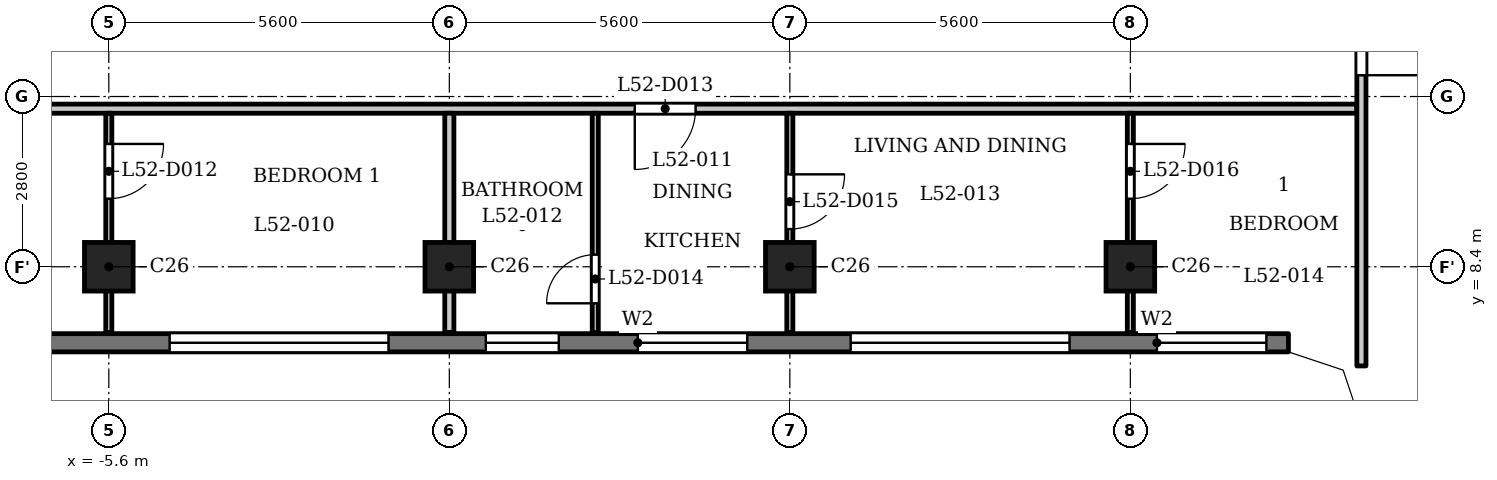
"""IFC4 building model, lengths in metres.
Left out: names, types, materials, properties, quantities, classifications, styles, units other than length and angle.
Written with IfcOpenShell. Run it as: python <this file> out.ifc"""

import sys

from ifc_helpers import new_model, si_unit, direction, frame, frame_2d, origin, origin_2d, place, context, subcontext, project, spatial, polyline, rectangle, outline, extrude, element, fill, save


model = new_model("IFC4")
c1 = context("Model", 3, precision=1e-05, world=origin(), true_north=direction((0.0, 1.0)))
c2 = subcontext(c1, "Body", "Model", "MODEL_VIEW")
j1 = project(units=[si_unit("LENGTHUNIT", "METRE"), si_unit("PLANEANGLEUNIT", "RADIAN")], contexts=[c1])
p1 = place(None, origin())
s1 = spatial("IfcSite", under=j1, at=p1, CompositionType="ELEMENT")
p2 = place(p1, origin())
s2 = spatial("IfcBuilding", under=s1, at=p2, CompositionType="ELEMENT")
p3 = place(p2, frame((0.0, 0.0, 202.9)))
s3 = spatial("IfcBuildingStorey", under=s2, at=p3, CompositionType="ELEMENT", Elevation=202.9)
for number, where, z_axis, x_axis in (
    (1, (-5.6, 8.4, 0.0), (0.0, 0.0, 1.0), (1.0, 0.0, 0.0)),
    (2, (0.0, 8.4, 0.0), (0.0, 0.0, 1.0), (1.0, 0.0, 0.0)),
    (3, (5.6, 8.4, 0.0), (0.0, 0.0, 1.0), (1.0, 0.0, 0.0)),
    (4, (11.2, 8.4, 0.0), (0.0, 0.0, 1.0), (1.0, 0.0, 0.0)),
):
    element("IfcColumn", number, at=place(p3, frame(where, z_axis=z_axis, x_axis=x_axis)), inside=s3, PredefinedType="COLUMN", context=c2, shape_type="SweptSolid", body=[
        extrude(rectangle(XDim=0.8, YDim=0.8, at=origin_2d()), origin(), (0.0, 0.0, 1.0), 3.5),
    ])
p4 = place(p3, frame((-13.8, 7.15, 0.0), z_axis=(0.0, 0.0, 1.0), x_axis=(1.0, 0.0, 0.0)))
e5 = element("IfcWall", 5, at=p4, inside=s3, PredefinedType="SOLIDWALL", context=c2, shape_type="SweptSolid", body=[
    extrude(rectangle(XDim=27.6, YDim=0.3, at=frame_2d((13.8, 0.0))), origin(), (0.0, 0.0, 1.0), 3.2),
])
p5 = place(p4, frame((3.6, 0.0, 1.2)))
e6 = element("IfcOpeningElement", 6, at=p5, cuts=e5, PredefinedType="OPENING", context=c2, shape_type="SweptSolid", body=[
    extrude(rectangle(XDim=3.6, YDim=0.95, at=frame_2d((1.8, 0.475))), frame((0.0, 0.16, 0.0), z_axis=(0.0, -1.0, 0.0), x_axis=(1.0, 0.0, 0.0)), (0.0, 0.0, 1.0), 0.32),
])
p6 = place(p4, frame((9.2, 0.0, 1.2)))
e7 = element("IfcOpeningElement", 7, at=p6, cuts=e5, PredefinedType="OPENING", context=c2, shape_type="SweptSolid", body=[
    extrude(rectangle(XDim=3.6, YDim=0.95, at=frame_2d((1.8, 0.475))), frame((0.0, 0.16, 0.0), z_axis=(0.0, -1.0, 0.0), x_axis=(1.0, 0.0, 0.0)), (0.0, 0.0, 1.0), 0.32),
])
p7 = place(p4, frame((14.4, 0.0, 0.6)))
e8 = element("IfcOpeningElement", 8, at=p7, cuts=e5, PredefinedType="OPENING", context=c2, shape_type="SweptSolid", body=[
    extrude(rectangle(XDim=1.2, YDim=1.55, at=frame_2d((0.6, 0.775))), frame((0.0, 0.16, 0.0), z_axis=(0.0, -1.0, 0.0), x_axis=(1.0, 0.0, 0.0)), (0.0, 0.0, 1.0), 0.32),
])
p8 = place(p4, frame((16.9, 0.0, 0.9)))
e9 = element("IfcOpeningElement", 9, at=p8, cuts=e5, PredefinedType="OPENING", context=c2, shape_type="SweptSolid", body=[
    extrude(rectangle(XDim=1.8, YDim=1.25, at=frame_2d((0.9, 0.625))), frame((0.0, 0.16, 0.0), z_axis=(0.0, -1.0, 0.0), x_axis=(1.0, 0.0, 0.0)), (0.0, 0.0, 1.0), 0.32),
])
p9 = place(p4, frame((20.4, 0.0, 1.2)))
e10 = element("IfcOpeningElement", 10, at=p9, cuts=e5, PredefinedType="OPENING", context=c2, shape_type="SweptSolid", body=[
    extrude(rectangle(XDim=3.6, YDim=0.95, at=frame_2d((1.8, 0.475))), frame((0.0, 0.16, 0.0), z_axis=(0.0, -1.0, 0.0), x_axis=(1.0, 0.0, 0.0)), (0.0, 0.0, 1.0), 0.32),
])
p10 = place(p4, frame((25.438, 0.0, 0.9)))
e11 = element("IfcOpeningElement", 11, at=p10, cuts=e5, PredefinedType="OPENING", context=c2, shape_type="SweptSolid", body=[
    extrude(rectangle(XDim=1.8, YDim=1.25, at=frame_2d((0.9, 0.625))), frame((0.0, 0.16, 0.0), z_axis=(0.0, -1.0, 0.0), x_axis=(1.0, 0.0, 0.0)), (0.0, 0.0, 1.0), 0.32),
])
p11 = place(p3, frame((-14.925, 11.0, 0.0), z_axis=(0.0, 0.0, 1.0), x_axis=(1.0, 0.0, 0.0)))
e12 = element("IfcWall", 12, at=p11, inside=s3, PredefinedType="PARTITIONING", context=c2, shape_type="SweptSolid", body=[
    extrude(rectangle(XDim=29.85, YDim=0.15, at=frame_2d((14.925, 0.0))), origin(), (0.0, 0.0, 1.0), 3.2),
])
p12 = place(p11, frame((2.475, 0.0, 0.0)))
e13 = element("IfcOpeningElement", 13, at=p12, cuts=e12, PredefinedType="OPENING", context=c2, shape_type="SweptSolid", body=[
    extrude(rectangle(XDim=1.0, YDim=2.1, at=frame_2d((0.5, 1.05))), frame((0.0, 0.085, 0.0), z_axis=(0.0, -1.0, 0.0), x_axis=(1.0, 0.0, 0.0)), (0.0, 0.0, 1.0), 0.17),
])
p13 = place(p11, frame((17.975, 0.0, 0.0)))
e14 = element("IfcOpeningElement", 14, at=p13, cuts=e12, PredefinedType="OPENING", context=c2, shape_type="SweptSolid", body=[
    extrude(rectangle(XDim=1.0, YDim=2.1, at=frame_2d((0.5, 1.05))), frame((0.0, 0.085, 0.0), z_axis=(0.0, -1.0, 0.0), x_axis=(1.0, 0.0, 0.0)), (0.0, 0.0, 1.0), 0.17),
])
p14 = place(p3, frame((-5.6, 7.32, 0.0), z_axis=(0.0, 0.0, 1.0), x_axis=(0.0, 1.0, 0.0)))
e15 = element("IfcWall", 15, at=p14, inside=s3, PredefinedType="PARTITIONING", context=c2, shape_type="SweptSolid", body=[
    extrude(rectangle(XDim=3.605, YDim=0.1, at=frame_2d((1.802, 0.0))), origin(), (0.0, 0.0, 1.0), 3.2),
])
p15 = place(p14, frame((2.2, 0.0, 0.0)))
e16 = element("IfcOpeningElement", 16, at=p15, cuts=e15, PredefinedType="OPENING", context=c2, shape_type="SweptSolid", body=[
    extrude(rectangle(XDim=0.9, YDim=2.1, at=frame_2d((0.45, 1.05))), frame((0.0, 0.06, 0.0), z_axis=(0.0, -1.0, 0.0), x_axis=(1.0, 0.0, 0.0)), (0.0, 0.0, 1.0), 0.12),
])
p16 = place(p3, frame((0.0, 7.32, 0.0), z_axis=(0.0, 0.0, 1.0), x_axis=(0.0, 1.0, 0.0)))
e17 = element("IfcWall", 17, at=p16, inside=s3, PredefinedType="PARTITIONING", context=c2, shape_type="SweptSolid", body=[
    extrude(rectangle(XDim=3.605, YDim=0.15, at=frame_2d((1.802, 0.0))), origin(), (0.0, 0.0, 1.0), 3.2),
])
p17 = place(p3, frame((2.4, 7.32, 0.0), z_axis=(0.0, 0.0, 1.0), x_axis=(0.0, 1.0, 0.0)))
e18 = element("IfcWall", 18, at=p17, inside=s3, PredefinedType="PARTITIONING", context=c2, shape_type="SweptSolid", body=[
    extrude(rectangle(XDim=3.605, YDim=0.1, at=frame_2d((1.802, 0.0))), origin(), (0.0, 0.0, 1.0), 3.2),
])
p18 = place(p17, frame((0.479, 0.0, 0.0)))
e19 = element("IfcOpeningElement", 19, at=p18, cuts=e18, PredefinedType="OPENING", context=c2, shape_type="SweptSolid", body=[
    extrude(rectangle(XDim=0.8, YDim=2.1, at=frame_2d((0.4, 1.05))), frame((0.0, 0.06, 0.0), z_axis=(0.0, -1.0, 0.0), x_axis=(1.0, 0.0, 0.0)), (0.0, 0.0, 1.0), 0.12),
])
p19 = place(p3, frame((5.6, 7.32, 0.0), z_axis=(0.0, 0.0, 1.0), x_axis=(0.0, 1.0, 0.0)))
e20 = element("IfcWall", 20, at=p19, inside=s3, PredefinedType="PARTITIONING", context=c2, shape_type="SweptSolid", body=[
    extrude(rectangle(XDim=3.605, YDim=0.1, at=frame_2d((1.802, 0.0))), origin(), (0.0, 0.0, 1.0), 3.2),
])
p20 = place(p19, frame((1.7, 0.0, 0.0)))
e21 = element("IfcOpeningElement", 21, at=p20, cuts=e20, PredefinedType="OPENING", context=c2, shape_type="SweptSolid", body=[
    extrude(rectangle(XDim=0.9, YDim=2.1, at=frame_2d((0.45, 1.05))), frame((0.0, 0.06, 0.0), z_axis=(0.0, -1.0, 0.0), x_axis=(1.0, 0.0, 0.0)), (0.0, 0.0, 1.0), 0.12),
])
p21 = place(p3, frame((11.2, 7.32, 0.0), z_axis=(0.0, 0.0, 1.0), x_axis=(0.0, 1.0, 0.0)))
e22 = element("IfcWall", 22, at=p21, inside=s3, PredefinedType="PARTITIONING", context=c2, shape_type="SweptSolid", body=[
    extrude(rectangle(XDim=3.605, YDim=0.1, at=frame_2d((1.802, 0.0))), origin(), (0.0, 0.0, 1.0), 3.2),
])
p22 = place(p21, frame((2.2, 0.0, 0.0)))
e23 = element("IfcOpeningElement", 23, at=p22, cuts=e22, PredefinedType="OPENING", context=c2, shape_type="SweptSolid", body=[
    extrude(rectangle(XDim=0.9, YDim=2.1, at=frame_2d((0.45, 1.05))), frame((0.0, 0.06, 0.0), z_axis=(0.0, -1.0, 0.0), x_axis=(1.0, 0.0, 0.0)), (0.0, 0.0, 1.0), 0.12),
])
p23 = place(p3, frame((15.0, 6.769, 0.0), z_axis=(0.0, 0.0, 1.0), x_axis=(0.0, 1.0, 0.0)))
e24 = element("IfcWall", 24, at=p23, inside=s3, PredefinedType="PARTITIONING", context=c2, shape_type="SweptSolid", body=[
    extrude(rectangle(XDim=6.356, YDim=0.15, at=frame_2d((3.178, 0.0))), origin(), (0.0, 0.0, 1.0), 3.2),
])
p24 = place(p23, frame((4.781, 0.0, 0.0)))
e25 = element("IfcOpeningElement", 25, at=p24, cuts=e24, PredefinedType="OPENING", context=c2, shape_type="SweptSolid", body=[
    extrude(rectangle(XDim=1.0, YDim=2.1, at=frame_2d((0.5, 1.05))), frame((0.0, 0.085, 0.0), z_axis=(0.0, -1.0, 0.0), x_axis=(1.0, 0.0, 0.0)), (0.0, 0.0, 1.0), 0.17),
])
p25 = place(p3, origin())
e26 = element("IfcWall", 26, at=p25, inside=s3, PredefinedType="SOLIDWALL", context=c2, shape_type="SweptSolid", body=[
    extrude(outline(polyline([(14.937, 6.937), (13.849, 7.3), (13.8, 7.3), (13.8, 7.0), (14.7, 6.7), (15.0, 5.8), (15.3, 5.8), (15.3, 5.849), (14.937, 6.937)])), origin(), (0.0, 0.0, 1.0), 3.2),
])
p26 = place(p24, origin())
e27 = element("IfcDoor", 27, at=p26, inside=s3, OperationType="SINGLE_SWING_LEFT", PredefinedType="DOOR", context=c2, shape_type="SweptSolid", body=[
    extrude(rectangle(XDim=1.0, YDim=2.1, at=frame_2d((0.5, 1.05))), frame((0.0, 0.025, 0.0), z_axis=(0.0, -1.0, 0.0), x_axis=(1.0, 0.0, 0.0)), (0.0, 0.0, 1.0), 0.05),
])
fill(e25, e27)
p27 = place(p15, origin())
e28 = element("IfcDoor", 28, at=p27, inside=s3, OperationType="SINGLE_SWING_RIGHT", PredefinedType="DOOR", context=c2, shape_type="SweptSolid", body=[
    extrude(rectangle(XDim=0.9, YDim=2.1, at=frame_2d((0.45, 1.05))), frame((0.0, 0.025, 0.0), z_axis=(0.0, -1.0, 0.0), x_axis=(1.0, 0.0, 0.0)), (0.0, 0.0, 1.0), 0.05),
])
fill(e16, e28)
p28 = place(p13, origin())
e29 = element("IfcDoor", 29, at=p28, inside=s3, OperationType="SINGLE_SWING_LEFT", PredefinedType="DOOR", context=c2, shape_type="SweptSolid", body=[
    extrude(rectangle(XDim=1.0, YDim=2.1, at=frame_2d((0.5, 1.05))), frame((0.0, 0.025, 0.0), z_axis=(0.0, -1.0, 0.0), x_axis=(1.0, 0.0, 0.0)), (0.0, 0.0, 1.0), 0.05),
])
fill(e14, e29)
p29 = place(p18, origin())
e30 = element("IfcDoor", 30, at=p29, inside=s3, OperationType="SINGLE_SWING_RIGHT", PredefinedType="DOOR", context=c2, shape_type="SweptSolid", body=[
    extrude(rectangle(XDim=0.8, YDim=2.1, at=frame_2d((0.4, 1.05))), frame((0.0, 0.025, 0.0), z_axis=(0.0, -1.0, 0.0), x_axis=(1.0, 0.0, 0.0)), (0.0, 0.0, 1.0), 0.05),
])
fill(e19, e30)
p30 = place(p20, origin())
e31 = element("IfcDoor", 31, at=p30, inside=s3, OperationType="SINGLE_SWING_RIGHT", PredefinedType="DOOR", context=c2, shape_type="SweptSolid", body=[
    extrude(rectangle(XDim=0.9, YDim=2.1, at=frame_2d((0.45, 1.05))), frame((0.0, 0.025, 0.0), z_axis=(0.0, -1.0, 0.0), x_axis=(1.0, 0.0, 0.0)), (0.0, 0.0, 1.0), 0.05),
])
fill(e21, e31)
p31 = place(p22, origin())
e32 = element("IfcDoor", 32, at=p31, inside=s3, OperationType="SINGLE_SWING_RIGHT", PredefinedType="DOOR", context=c2, shape_type="SweptSolid", body=[
    extrude(rectangle(XDim=0.9, YDim=2.1, at=frame_2d((0.45, 1.05))), frame((0.0, 0.025, 0.0), z_axis=(0.0, -1.0, 0.0), x_axis=(1.0, 0.0, 0.0)), (0.0, 0.0, 1.0), 0.05),
])
fill(e23, e32)
p32 = place(p6, origin())
e33 = element("IfcWindow", 33, at=p32, inside=s3, PartitioningType="SINGLE_PANEL", PredefinedType="WINDOW", context=c2, shape_type="SweptSolid", body=[
    extrude(rectangle(XDim=3.6, YDim=0.95, at=frame_2d((1.8, 0.475))), frame((0.0, 0.03, 0.0), z_axis=(0.0, -1.0, 0.0), x_axis=(1.0, 0.0, 0.0)), (0.0, 0.0, 1.0), 0.06),
])
fill(e7, e33)
p33 = place(p7, origin())
e34 = element("IfcWindow", 34, at=p33, inside=s3, PartitioningType="SINGLE_PANEL", PredefinedType="WINDOW", context=c2, shape_type="SweptSolid", body=[
    extrude(rectangle(XDim=1.2, YDim=1.55, at=frame_2d((0.6, 0.775))), frame((0.0, 0.03, 0.0), z_axis=(0.0, -1.0, 0.0), x_axis=(1.0, 0.0, 0.0)), (0.0, 0.0, 1.0), 0.06),
])
fill(e8, e34)
p34 = place(p8, origin())
e35 = element("IfcWindow", 35, at=p34, inside=s3, PartitioningType="SINGLE_PANEL", PredefinedType="WINDOW", context=c2, shape_type="SweptSolid", body=[
    extrude(rectangle(XDim=1.8, YDim=1.25, at=frame_2d((0.9, 0.625))), frame((0.0, 0.03, 0.0), z_axis=(0.0, -1.0, 0.0), x_axis=(1.0, 0.0, 0.0)), (0.0, 0.0, 1.0), 0.06),
])
fill(e9, e35)
p35 = place(p9, origin())
e36 = element("IfcWindow", 36, at=p35, inside=s3, PartitioningType="SINGLE_PANEL", PredefinedType="WINDOW", context=c2, shape_type="SweptSolid", body=[
    extrude(rectangle(XDim=3.6, YDim=0.95, at=frame_2d((1.8, 0.475))), frame((0.0, 0.03, 0.0), z_axis=(0.0, -1.0, 0.0), x_axis=(1.0, 0.0, 0.0)), (0.0, 0.0, 1.0), 0.06),
])
fill(e10, e36)
p36 = place(p10, origin())
e37 = element("IfcWindow", 37, at=p36, inside=s3, PartitioningType="SINGLE_PANEL", PredefinedType="WINDOW", context=c2, shape_type="SweptSolid", body=[
    extrude(rectangle(XDim=1.8, YDim=1.25, at=frame_2d((0.9, 0.625))), frame((0.0, 0.03, 0.0), z_axis=(0.0, -1.0, 0.0), x_axis=(1.0, 0.0, 0.0)), (0.0, 0.0, 1.0), 0.06),
])
fill(e11, e37)
save(model, sys.argv[1])
